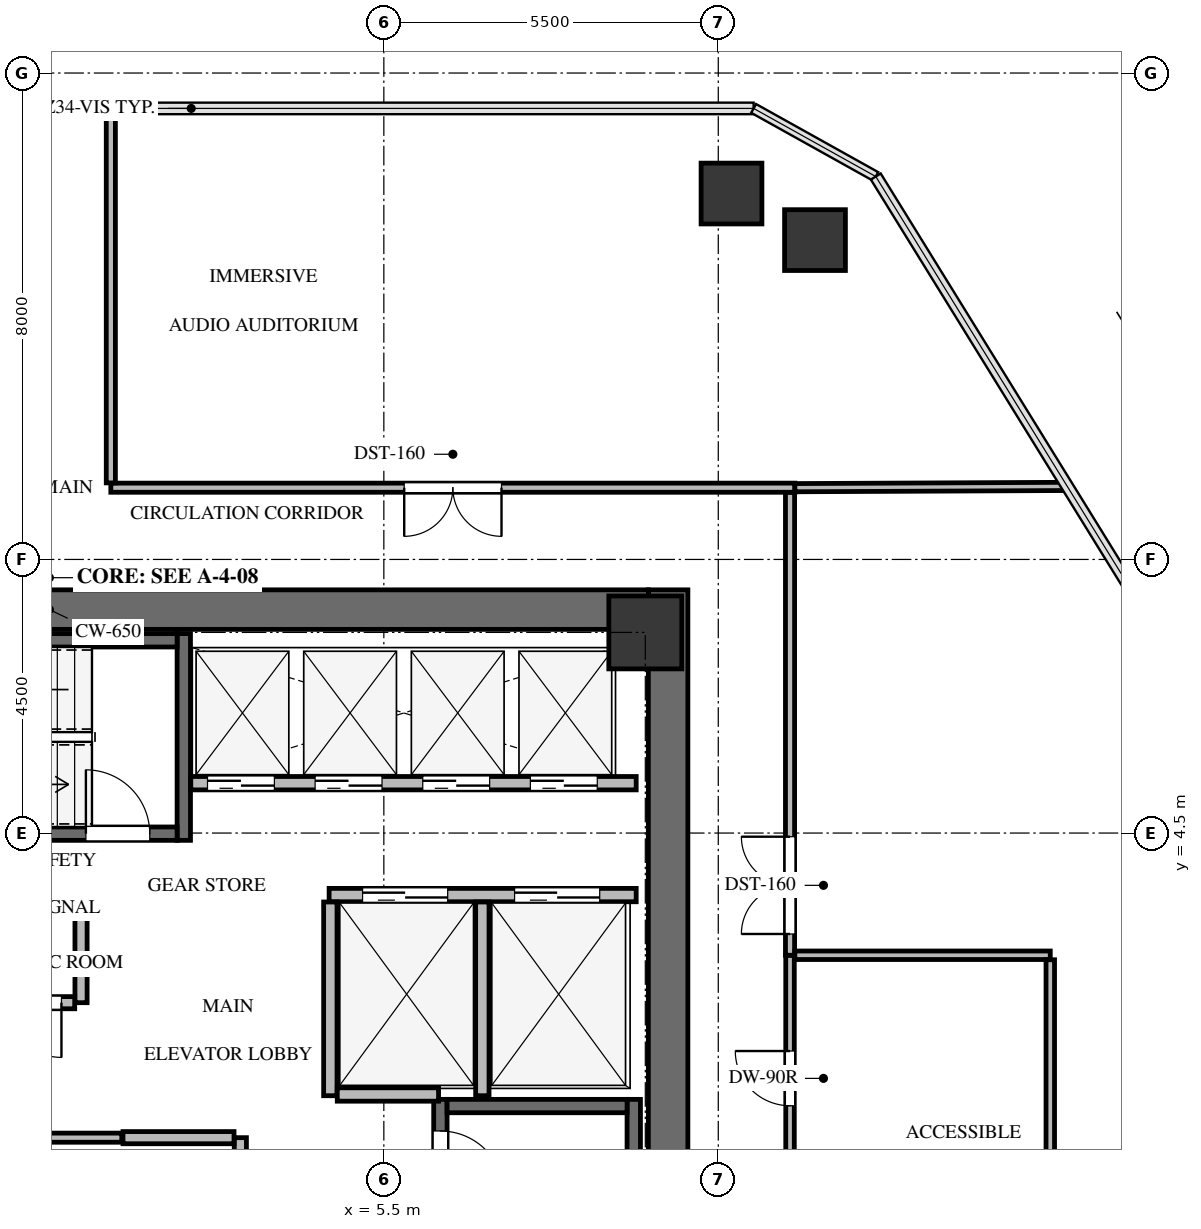
"""IFC4 building model, lengths in metres.
Left out: names, types, materials, properties, quantities, classifications, styles, units other than length and angle.
Written with IfcOpenShell. Run it as: python <this file> out.ifc"""

import sys

from ifc_helpers import new_model, si_unit, direction, frame, frame_2d, origin, origin_2d, place, context, subcontext, project, spatial, rectangle, extrude, source, transform, mapped, element, fill, save


model = new_model("IFC4")
c1 = context("Model", 3, precision=1e-05, world=origin(), true_north=direction((0.0, 1.0)))
c2 = subcontext(c1, "Body", "Model", "MODEL_VIEW")
j1 = project(units=[si_unit("LENGTHUNIT", "METRE"), si_unit("PLANEANGLEUNIT", "RADIAN")], contexts=[c1])
p1 = place(None, origin())
s1 = spatial("IfcSite", under=j1, at=p1, CompositionType="ELEMENT")
p2 = place(p1, origin())
s2 = spatial("IfcBuilding", under=s1, at=p2, CompositionType="ELEMENT")
p3 = place(p2, frame((0.0, 0.0, 167.2)))
s3 = spatial("IfcBuildingStorey", under=s2, at=p3, CompositionType="ELEMENT", Elevation=167.2)
p4 = place(p3, frame((10.175, -8.5, 0.0), z_axis=(0.0, 0.0, 1.0), x_axis=(0.0, 1.0, 0.0)))
e1 = element("IfcWall", 1, at=p4, inside=s3, PredefinedType="SHEAR", context=c2, shape_type="SweptSolid", body=[
    extrude(rectangle(XDim=17.0, YDim=0.65, at=frame_2d((8.5, 0.0))), origin(), (0.0, 0.0, 1.0), 3.3),
])
p5 = place(p3, frame((-9.85, 8.175, 0.0), z_axis=(0.0, 0.0, 1.0), x_axis=(1.0, 0.0, 0.0)))
e2 = element("IfcWall", 2, at=p5, inside=s3, PredefinedType="SHEAR", context=c2, shape_type="SweptSolid", body=[
    extrude(rectangle(XDim=19.7, YDim=0.65, at=frame_2d((9.85, 0.0))), origin(), (0.0, 0.0, 1.0), 3.3),
])
p6 = place(p3, frame((9.61, -7.77, -0.24), z_axis=(0.0, 0.0, 1.0), x_axis=(0.0, 1.0, 0.0)))
e3 = element("IfcWall", 3, at=p6, inside=s3, PredefinedType="SHEAR", context=c2, shape_type="SweptSolid", body=[
    extrude(rectangle(XDim=7.89, YDim=0.22, at=frame_2d((3.945, 0.0))), origin(), (0.0, 0.0, 1.0), 3.3),
])
p7 = place(p3, frame((6.43, 0.12, -0.24), z_axis=(0.0, 0.0, 1.0), x_axis=(0.0, -1.0, 0.0)))
e4 = element("IfcWall", 4, at=p7, inside=s3, PredefinedType="SHEAR", context=c2, shape_type="SweptSolid", body=[
    extrude(rectangle(XDim=7.89, YDim=0.22, at=frame_2d((3.945, 0.0))), origin(), (0.0, 0.0, 1.0), 3.3),
])
p8 = place(p7, frame((0.52, 0.0, 0.0)))
e5 = element("IfcOpeningElement", 5, at=p8, cuts=e4, PredefinedType="OPENING", context=c2, shape_type="SweptSolid", body=[
    extrude(rectangle(XDim=1.05, YDim=2.15, at=frame_2d((0.525, 1.075))), frame((0.0, 0.12, 0.0), z_axis=(0.0, -1.0, 0.0), x_axis=(1.0, 0.0, 0.0)), (0.0, 0.0, 1.0), 0.24),
])
p9 = place(p3, frame((9.5, 0.01, -0.24), z_axis=(0.0, 0.0, 1.0), x_axis=(-1.0, 0.0, 0.0)))
e6 = element("IfcWall", 6, at=p9, inside=s3, PredefinedType="SHEAR", context=c2, shape_type="SweptSolid", body=[
    extrude(rectangle(XDim=2.96, YDim=0.22, at=frame_2d((1.48, 0.0))), origin(), (0.0, 0.0, 1.0), 3.3),
])
p10 = place(p3, frame((2.21, 4.38, -0.24), z_axis=(0.0, 0.0, 1.0), x_axis=(0.0, 1.0, 0.0)))
e7 = element("IfcWall", 7, at=p10, inside=s3, PredefinedType="SHEAR", context=c2, shape_type="SweptSolid", body=[
    extrude(rectangle(XDim=3.4, YDim=0.22, at=frame_2d((1.7, 0.0))), origin(), (0.0, 0.0, 1.0), 3.3),
])
p11 = place(p3, frame((-5.25, 4.49, -0.24), z_axis=(0.0, 0.0, 1.0), x_axis=(1.0, 0.0, 0.0)))
e8 = element("IfcWall", 8, at=p11, inside=s3, PredefinedType="SHEAR", context=c2, shape_type="SweptSolid", body=[
    extrude(rectangle(XDim=7.35, YDim=0.22, at=frame_2d((3.675, 0.0))), origin(), (0.0, 0.0, 1.0), 3.3),
])
p12 = place(p11, frame((5.85, 0.0, 0.0)))
e9 = element("IfcOpeningElement", 9, at=p12, cuts=e8, PredefinedType="OPENING", context=c2, shape_type="SweptSolid", body=[
    extrude(rectangle(XDim=1.05, YDim=2.15, at=frame_2d((0.525, 1.075))), frame((0.0, 0.12, 0.0), z_axis=(0.0, -1.0, 0.0), x_axis=(1.0, 0.0, 0.0)), (0.0, 0.0, 1.0), 0.24),
])
p13 = place(p3, frame((2.1, 7.67, -0.24), z_axis=(0.0, 0.0, 1.0), x_axis=(-1.0, 0.0, 0.0)))
e10 = element("IfcWall", 10, at=p13, inside=s3, PredefinedType="SHEAR", context=c2, shape_type="SweptSolid", body=[
    extrude(rectangle(XDim=7.35, YDim=0.22, at=frame_2d((3.675, 0.0))), origin(), (0.0, 0.0, 1.0), 3.3),
])
m1 = source(origin(), c2, "Body", "SweptSolid", [
    extrude(rectangle(XDim=1.2, YDim=1.2, at=origin_2d()), origin(), (0.0, 0.0, 1.0), 3.3),
])
p14 = place(p3, frame((9.8, 7.8, -0.24), z_axis=(0.0, 0.0, 1.0), x_axis=(1.0, 0.0, 0.0)))
e11 = element("IfcColumn", 11, at=p14, inside=s3, PredefinedType="COLUMN", context=c2, shape_type="MappedRepresentation", body=[
    mapped(m1, transform((0.0, 0.0, 0.0), x_axis=(1.0, 0.0, 0.0), y_axis=(0.0, 1.0, 0.0), z_axis=(0.0, 0.0, 1.0), scale=1.0)),
])
m2 = source(origin(), c2, "Body", "SweptSolid", [
    extrude(rectangle(XDim=1.0, YDim=1.0, at=origin_2d()), origin(), (0.0, 0.0, 1.0), 3.3),
])
for number, where, z_axis, x_axis in (
    (12, (11.218, 15.018, -0.24), (0.0, 0.0, 1.0), (1.0, 0.0, 0.0)),
    (13, (12.591, 14.252, -0.24), (0.0, 0.0, 1.0), (1.0, 0.0, 0.0)),
):
    element("IfcColumn", number, at=place(p3, frame(where, z_axis=z_axis, x_axis=x_axis)), inside=s3, PredefinedType="COLUMN", context=c2, shape_type="MappedRepresentation", body=[
        mapped(m2, transform((0.0, 0.0, 0.0), x_axis=(1.0, 0.0, 0.0), y_axis=(0.0, 1.0, 0.0), z_axis=(0.0, 0.0, 1.0), scale=1.0)),
    ])
p15 = place(p3, frame((4.6, 3.48, 0.0), z_axis=(0.0, 0.0, 1.0), x_axis=(1.0, 0.0, 0.0)))
e14 = element("IfcWall", 14, at=p15, inside=s3, PredefinedType="SOLIDWALL", context=c2, shape_type="SweptSolid", body=[
    extrude(rectangle(XDim=5.05, YDim=0.22, at=frame_2d((2.525, 0.0))), origin(), (0.0, 0.0, 1.0), 3.045),
])
p16 = place(p15, frame((0.55, 0.0, 0.0)))
e15 = element("IfcOpeningElement", 15, at=p16, cuts=e14, PredefinedType="OPENING", context=c2, shape_type="SweptSolid", body=[
    extrude(rectangle(XDim=1.4, YDim=2.15, at=frame_2d((0.7, 1.075))), frame((0.0, 0.12, 0.0), z_axis=(0.0, -1.0, 0.0), x_axis=(1.0, 0.0, 0.0)), (0.0, 0.0, 1.0), 0.24),
])
p17 = place(p15, frame((3.05, 0.0, 0.0)))
e16 = element("IfcOpeningElement", 16, at=p17, cuts=e14, PredefinedType="OPENING", context=c2, shape_type="SweptSolid", body=[
    extrude(rectangle(XDim=1.4, YDim=2.15, at=frame_2d((0.7, 1.075))), frame((0.0, 0.12, 0.0), z_axis=(0.0, -1.0, 0.0), x_axis=(1.0, 0.0, 0.0)), (0.0, 0.0, 1.0), 0.24),
])
for number, where, z_axis, x_axis in (
    (17, (4.62, 0.18, 0.0), (0.0, 0.0, 1.0), (0.0, 1.0, 0.0)),
    (18, (7.12, 0.18, 0.0), (0.0, 0.0, 1.0), (0.0, 1.0, 0.0)),
):
    element("IfcWall", number, at=place(p3, frame(where, z_axis=z_axis, x_axis=x_axis)), inside=s3, PredefinedType="SOLIDWALL", context=c2, shape_type="SweptSolid", body=[
        extrude(rectangle(XDim=3.186, YDim=0.22, at=frame_2d((1.593, 0.0))), origin(), (0.0, 0.0, 1.0), 3.045),
    ])
p18 = place(p3, frame((4.734, 0.2, 0.0), z_axis=(0.0, 0.0, 1.0), x_axis=(1.0, 0.0, 0.0)))
e19 = element("IfcWall", 19, at=p18, inside=s3, PredefinedType="SOLIDWALL", context=c2, shape_type="SweptSolid", body=[
    extrude(rectangle(XDim=1.666, YDim=0.22, at=frame_2d((0.833, 0.0))), origin(), (0.0, 0.0, 1.0), 3.045),
])
p19 = place(p3, frame((2.325, 5.32, 0.0), z_axis=(0.0, 0.0, 1.0), x_axis=(1.0, 0.0, 0.0)))
e20 = element("IfcWall", 20, at=p19, inside=s3, PredefinedType="SOLIDWALL", context=c2, shape_type="SweptSolid", body=[
    extrude(rectangle(XDim=7.325, YDim=0.22, at=frame_2d((3.663, 0.0))), origin(), (0.0, 0.0, 1.0), 3.045),
])
p20 = place(p19, frame((0.275, 0.0, 0.0)))
e21 = element("IfcOpeningElement", 21, at=p20, cuts=e20, PredefinedType="OPENING", context=c2, shape_type="SweptSolid", body=[
    extrude(rectangle(XDim=1.1, YDim=2.15, at=frame_2d((0.55, 1.075))), frame((0.0, 0.12, 0.0), z_axis=(0.0, -1.0, 0.0), x_axis=(1.0, 0.0, 0.0)), (0.0, 0.0, 1.0), 0.24),
])
p21 = place(p19, frame((2.045, 0.0, 0.0)))
e22 = element("IfcOpeningElement", 22, at=p21, cuts=e20, PredefinedType="OPENING", context=c2, shape_type="SweptSolid", body=[
    extrude(rectangle(XDim=1.1, YDim=2.15, at=frame_2d((0.55, 1.075))), frame((0.0, 0.12, 0.0), z_axis=(0.0, -1.0, 0.0), x_axis=(1.0, 0.0, 0.0)), (0.0, 0.0, 1.0), 0.24),
])
p22 = place(p19, frame((3.815, 0.0, 0.0)))
e23 = element("IfcOpeningElement", 23, at=p22, cuts=e20, PredefinedType="OPENING", context=c2, shape_type="SweptSolid", body=[
    extrude(rectangle(XDim=1.1, YDim=2.15, at=frame_2d((0.55, 1.075))), frame((0.0, 0.12, 0.0), z_axis=(0.0, -1.0, 0.0), x_axis=(1.0, 0.0, 0.0)), (0.0, 0.0, 1.0), 0.24),
])
p23 = place(p19, frame((5.585, 0.0, 0.0)))
e24 = element("IfcOpeningElement", 24, at=p23, cuts=e20, PredefinedType="OPENING", context=c2, shape_type="SweptSolid", body=[
    extrude(rectangle(XDim=1.1, YDim=2.15, at=frame_2d((0.55, 1.075))), frame((0.0, 0.12, 0.0), z_axis=(0.0, -1.0, 0.0), x_axis=(1.0, 0.0, 0.0)), (0.0, 0.0, 1.0), 0.24),
])
p24 = place(p3, frame((-4.34, -0.51, 0.0), z_axis=(0.0, 0.0, 1.0), x_axis=(1.0, 0.0, 0.0)))
e25 = element("IfcWall", 25, at=p24, inside=s3, PredefinedType="PARTITIONING", context=c2, shape_type="SweptSolid", body=[
    extrude(rectangle(XDim=5.53, YDim=0.15, at=frame_2d((2.765, 0.0))), origin(), (0.0, 0.0, 1.0), 3.045),
])
p25 = place(p3, frame((3.14, -0.51, 0.0), z_axis=(0.0, 0.0, 1.0), x_axis=(0.0, -1.0, 0.0)))
e26 = element("IfcWall", 26, at=p25, inside=s3, PredefinedType="SOLIDWALL", context=c2, shape_type="SweptSolid", body=[
    extrude(rectangle(XDim=2.53, YDim=0.2, at=frame_2d((1.265, 0.0))), origin(), (0.0, 0.0, 1.0), 3.045),
])
p26 = place(p25, frame((0.815, 0.0, 0.0)))
e27 = element("IfcOpeningElement", 27, at=p26, cuts=e26, PredefinedType="OPENING", context=c2, shape_type="SweptSolid", body=[
    extrude(rectangle(XDim=0.9, YDim=2.05, at=frame_2d((0.45, 1.025))), frame((0.0, 0.11, 0.0), z_axis=(0.0, -1.0, 0.0), x_axis=(1.0, 0.0, 0.0)), (0.0, 0.0, 1.0), 0.22),
])
p27 = place(p3, frame((1.21, -0.51, 0.0), z_axis=(0.0, 0.0, 1.0), x_axis=(1.0, 0.0, 0.0)))
e28 = element("IfcWall", 28, at=p27, inside=s3, PredefinedType="SOLIDWALL", context=c2, shape_type="SweptSolid", body=[
    extrude(rectangle(XDim=1.826, YDim=0.2, at=frame_2d((0.913, 0.0))), origin(), (0.0, 0.0, 1.0), 3.045),
])
p28 = place(p3, frame((0.52, 3.3, 0.0), z_axis=(0.0, 0.0, 1.0), x_axis=(0.0, -1.0, 0.0)))
e29 = element("IfcWall", 29, at=p28, inside=s3, PredefinedType="SOLIDWALL", context=c2, shape_type="SweptSolid", body=[
    extrude(rectangle(XDim=1.59, YDim=0.2, at=frame_2d((0.795, 0.0))), origin(), (0.0, 0.0, 1.0), 3.045),
])
p29 = place(p3, frame((0.416, 1.71, 0.0), z_axis=(0.0, 0.0, 1.0), x_axis=(-1.0, 0.0, 0.0)))
e30 = element("IfcWall", 30, at=p29, inside=s3, PredefinedType="SOLIDWALL", context=c2, shape_type="SweptSolid", body=[
    extrude(rectangle(XDim=1.336, YDim=0.2, at=frame_2d((0.668, 0.0))), origin(), (0.0, 0.0, 1.0), 3.045),
])
p30 = place(p29, frame((0.218, 0.0, 0.0)))
e31 = element("IfcOpeningElement", 31, at=p30, cuts=e30, PredefinedType="OPENING", context=c2, shape_type="SweptSolid", body=[
    extrude(rectangle(XDim=0.9, YDim=2.05, at=frame_2d((0.45, 1.025))), frame((0.0, 0.11, 0.0), z_axis=(0.0, -1.0, 0.0), x_axis=(1.0, 0.0, 0.0)), (0.0, 0.0, 1.0), 0.22),
])
p31 = place(p3, frame((12.18, -1.56, 0.0), z_axis=(0.0, 0.0, 1.0), x_axis=(0.0, 1.0, 0.0)))
e32 = element("IfcWall", 32, at=p31, inside=s3, PredefinedType="PARTITIONING", context=c2, shape_type="SweptSolid", body=[
    extrude(rectangle(XDim=4.05, YDim=0.14, at=frame_2d((2.025, 0.0))), origin(), (0.0, 0.0, 1.0), 2.242),
])
p32 = place(p31, frame((1.575, 0.0, 0.0)))
e33 = element("IfcOpeningElement", 33, at=p32, cuts=e32, PredefinedType="OPENING", context=c2, shape_type="SweptSolid", body=[
    extrude(rectangle(XDim=0.9, YDim=2.05, at=frame_2d((0.45, 1.025))), frame((0.0, 0.08, 0.0), z_axis=(0.0, -1.0, 0.0), x_axis=(1.0, 0.0, 0.0)), (0.0, 0.0, 1.0), 0.16),
])
p33 = place(p3, frame((12.26, 10.18, 0.0), z_axis=(0.0, 0.0, 1.0), x_axis=(-1.0, 0.0, 0.0)))
e34 = element("IfcWall", 34, at=p33, inside=s3, PredefinedType="PARTITIONING", context=c2, shape_type="SweptSolid", body=[
    extrude(rectangle(XDim=11.25, YDim=0.15, at=frame_2d((5.625, 0.0))), origin(), (0.0, 0.0, 1.0), 2.242),
])
p34 = place(p33, frame((4.825, 0.0, 0.0)))
e35 = element("IfcOpeningElement", 35, at=p34, cuts=e34, PredefinedType="OPENING", context=c2, shape_type="SweptSolid", body=[
    extrude(rectangle(XDim=1.6, YDim=2.15, at=frame_2d((0.8, 1.075))), frame((0.0, 0.085, 0.0), z_axis=(0.0, -1.0, 0.0), x_axis=(1.0, 0.0, 0.0)), (0.0, 0.0, 1.0), 0.17),
])
p35 = place(p3, frame((1.01, 10.259, 0.0), z_axis=(0.0, 0.0, 1.0), x_axis=(0.0, 1.0, 0.0)))
e36 = element("IfcWall", 36, at=p35, inside=s3, PredefinedType="PARTITIONING", context=c2, shape_type="SweptSolid", body=[
    extrude(rectangle(XDim=6.159, YDim=0.15, at=frame_2d((3.08, 0.0))), origin(), (0.0, 0.0, 1.0), 2.399),
])
p36 = place(p3, frame((12.18, 2.49, 0.0), z_axis=(0.0, 0.0, 1.0), x_axis=(0.0, 1.0, 0.0)))
e37 = element("IfcWall", 37, at=p36, inside=s3, PredefinedType="PARTITIONING", context=c2, shape_type="SweptSolid", body=[
    extrude(rectangle(XDim=7.611, YDim=0.15, at=frame_2d((3.806, 0.0))), origin(), (0.0, 0.0, 1.0), 3.045),
])
p37 = place(p36, frame((0.35, 0.0, 0.0)))
e38 = element("IfcOpeningElement", 38, at=p37, cuts=e37, PredefinedType="OPENING", context=c2, shape_type="SweptSolid", body=[
    extrude(rectangle(XDim=1.6, YDim=2.15, at=frame_2d((0.8, 1.075))), frame((0.0, 0.085, 0.0), z_axis=(0.0, -1.0, 0.0), x_axis=(1.0, 0.0, 0.0)), (0.0, 0.0, 1.0), 0.17),
])
p38 = place(p3, frame((12.259, 2.49, 0.0), z_axis=(0.0, 0.0, 1.0), x_axis=(1.0, 0.0, 0.0)))
e39 = element("IfcWall", 39, at=p38, inside=s3, PredefinedType="PARTITIONING", context=c2, shape_type="SweptSolid", body=[
    extrude(rectangle(XDim=4.201, YDim=0.14, at=frame_2d((2.101, 0.0))), origin(), (0.0, 0.0, 1.0), 3.045),
])
p39 = place(p3, frame((16.46, 2.416, 0.0), z_axis=(0.0, 0.0, 1.0), x_axis=(0.0, -1.0, 0.0)))
e40 = element("IfcWall", 40, at=p39, inside=s3, PredefinedType="PARTITIONING", context=c2, shape_type="SweptSolid", body=[
    extrude(rectangle(XDim=3.902, YDim=0.14, at=frame_2d((1.951, 0.0))), origin(), (0.0, 0.0, 1.0), 2.242),
])
p40 = place(p3, frame((16.74, 10.201, 0.0), z_axis=(0.0, 0.0, 1.0), x_axis=(-0.999989522694, -0.004577608714, 0.0)))
e41 = element("IfcWall", 41, at=p40, inside=s3, PredefinedType="PARTITIONING", context=c2, shape_type="SweptSolid", body=[
    extrude(rectangle(XDim=4.48, YDim=0.135, at=frame_2d((2.24, 0.0))), origin(), (0.0, 0.0, 1.0), 2.399),
])
m3 = source(origin(), c2, "Body", "SweptSolid", [
    extrude(rectangle(XDim=1.05, YDim=2.15, at=frame_2d((0.525, 1.075))), frame((0.0, 0.025, 0.0), z_axis=(0.0, -1.0, 0.0), x_axis=(1.0, 0.0, 0.0)), (0.0, 0.0, 1.0), 0.05),
])
p41 = place(p8, origin())
e42 = element("IfcDoor", 42, at=p41, inside=s3, OperationType="SINGLE_SWING_RIGHT", PredefinedType="DOOR", context=c2, shape_type="MappedRepresentation", body=[
    mapped(m3, transform((0.0, 0.0, 0.0), x_axis=(1.0, 0.0, 0.0), y_axis=(0.0, 1.0, 0.0), z_axis=(0.0, 0.0, 1.0), scale=1.0)),
])
fill(e5, e42)
m4 = source(origin(), c2, "Body", "SweptSolid", [
    extrude(rectangle(XDim=1.05, YDim=2.15, at=frame_2d((0.525, 1.075))), frame((0.0, 0.025, 0.0), z_axis=(0.0, -1.0, 0.0), x_axis=(1.0, 0.0, 0.0)), (0.0, 0.0, 1.0), 0.05),
])
p42 = place(p12, origin())
e43 = element("IfcDoor", 43, at=p42, inside=s3, OperationType="SINGLE_SWING_LEFT", PredefinedType="DOOR", context=c2, shape_type="MappedRepresentation", body=[
    mapped(m4, transform((0.0, 0.0, 0.0), x_axis=(1.0, 0.0, 0.0), y_axis=(0.0, 1.0, 0.0), z_axis=(0.0, 0.0, 1.0), scale=1.0)),
])
fill(e9, e43)
m5 = source(origin(), c2, "Body", "SweptSolid", [
    extrude(rectangle(XDim=1.4, YDim=2.15, at=frame_2d((0.7, 1.075))), frame((0.0, 0.025, 0.0), z_axis=(0.0, -1.0, 0.0), x_axis=(1.0, 0.0, 0.0)), (0.0, 0.0, 1.0), 0.05),
])
p43 = place(p16, origin())
e44 = element("IfcDoor", 44, at=p43, inside=s3, OperationType="DOUBLE_DOOR_SLIDING", PredefinedType="DOOR", context=c2, shape_type="MappedRepresentation", body=[
    mapped(m5, transform((0.0, 0.0, 0.0), x_axis=(1.0, 0.0, 0.0), y_axis=(0.0, 1.0, 0.0), z_axis=(0.0, 0.0, 1.0), scale=1.0)),
])
fill(e15, e44)
p44 = place(p17, origin())
e45 = element("IfcDoor", 45, at=p44, inside=s3, OperationType="DOUBLE_DOOR_SLIDING", PredefinedType="DOOR", context=c2, shape_type="MappedRepresentation", body=[
    mapped(m5, transform((0.0, 0.0, 0.0), x_axis=(1.0, 0.0, 0.0), y_axis=(0.0, 1.0, 0.0), z_axis=(0.0, 0.0, 1.0), scale=1.0)),
])
fill(e16, e45)
m6 = source(origin(), c2, "Body", "SweptSolid", [
    extrude(rectangle(XDim=1.1, YDim=2.15, at=frame_2d((0.55, 1.075))), frame((0.0, 0.025, 0.0), z_axis=(0.0, -1.0, 0.0), x_axis=(1.0, 0.0, 0.0)), (0.0, 0.0, 1.0), 0.05),
])
p45 = place(p20, origin())
e46 = element("IfcDoor", 46, at=p45, inside=s3, OperationType="DOUBLE_DOOR_SLIDING", PredefinedType="DOOR", context=c2, shape_type="MappedRepresentation", body=[
    mapped(m6, transform((0.0, 0.0, 0.0), x_axis=(1.0, 0.0, 0.0), y_axis=(0.0, 1.0, 0.0), z_axis=(0.0, 0.0, 1.0), scale=1.0)),
])
fill(e21, e46)
p46 = place(p21, origin())
e47 = element("IfcDoor", 47, at=p46, inside=s3, OperationType="DOUBLE_DOOR_SLIDING", PredefinedType="DOOR", context=c2, shape_type="MappedRepresentation", body=[
    mapped(m6, transform((0.0, 0.0, 0.0), x_axis=(1.0, 0.0, 0.0), y_axis=(0.0, 1.0, 0.0), z_axis=(0.0, 0.0, 1.0), scale=1.0)),
])
fill(e22, e47)
p47 = place(p22, origin())
e48 = element("IfcDoor", 48, at=p47, inside=s3, OperationType="DOUBLE_DOOR_SLIDING", PredefinedType="DOOR", context=c2, shape_type="MappedRepresentation", body=[
    mapped(m6, transform((0.0, 0.0, 0.0), x_axis=(1.0, 0.0, 0.0), y_axis=(0.0, 1.0, 0.0), z_axis=(0.0, 0.0, 1.0), scale=1.0)),
])
fill(e23, e48)
p48 = place(p23, origin())
e49 = element("IfcDoor", 49, at=p48, inside=s3, OperationType="DOUBLE_DOOR_SLIDING", PredefinedType="DOOR", context=c2, shape_type="MappedRepresentation", body=[
    mapped(m6, transform((0.0, 0.0, 0.0), x_axis=(1.0, 0.0, 0.0), y_axis=(0.0, 1.0, 0.0), z_axis=(0.0, 0.0, 1.0), scale=1.0)),
])
fill(e24, e49)
m7 = source(origin(), c2, "Body", "SweptSolid", [
    extrude(rectangle(XDim=0.9, YDim=2.05, at=frame_2d((0.45, 1.025))), frame((0.0, 0.025, 0.0), z_axis=(0.0, -1.0, 0.0), x_axis=(1.0, 0.0, 0.0)), (0.0, 0.0, 1.0), 0.05),
])
p49 = place(p30, origin())
e50 = element("IfcDoor", 50, at=p49, inside=s3, OperationType="SINGLE_SWING_LEFT", PredefinedType="DOOR", context=c2, shape_type="MappedRepresentation", body=[
    mapped(m7, transform((0.0, 0.0, 0.0), x_axis=(1.0, 0.0, 0.0), y_axis=(0.0, 1.0, 0.0), z_axis=(0.0, 0.0, 1.0), scale=1.0)),
])
fill(e31, e50)
m8 = source(origin(), c2, "Body", "SweptSolid", [
    extrude(rectangle(XDim=0.9, YDim=2.05, at=frame_2d((0.45, 1.025))), frame((0.0, 0.025, 0.0), z_axis=(0.0, -1.0, 0.0), x_axis=(1.0, 0.0, 0.0)), (0.0, 0.0, 1.0), 0.05),
])
p50 = place(p32, origin())
e51 = element("IfcDoor", 51, at=p50, inside=s3, OperationType="SINGLE_SWING_RIGHT", PredefinedType="DOOR", context=c2, shape_type="MappedRepresentation", body=[
    mapped(m8, transform((0.0, 0.0, 0.0), x_axis=(1.0, 0.0, 0.0), y_axis=(0.0, 1.0, 0.0), z_axis=(0.0, 0.0, 1.0), scale=1.0)),
])
fill(e33, e51)
m9 = source(origin(), c2, "Body", "SweptSolid", [
    extrude(rectangle(XDim=1.6, YDim=2.15, at=frame_2d((0.8, 1.075))), frame((0.0, 0.025, 0.0), z_axis=(0.0, -1.0, 0.0), x_axis=(1.0, 0.0, 0.0)), (0.0, 0.0, 1.0), 0.05),
])
p51 = place(p34, origin())
e52 = element("IfcDoor", 52, at=p51, inside=s3, OperationType="DOUBLE_DOOR_SINGLE_SWING", PredefinedType="DOOR", context=c2, shape_type="MappedRepresentation", body=[
    mapped(m9, transform((0.0, 0.0, 0.0), x_axis=(1.0, 0.0, 0.0), y_axis=(0.0, 1.0, 0.0), z_axis=(0.0, 0.0, 1.0), scale=1.0)),
])
fill(e35, e52)
p52 = place(p37, origin())
e53 = element("IfcDoor", 53, at=p52, inside=s3, OperationType="DOUBLE_DOOR_SINGLE_SWING", PredefinedType="DOOR", context=c2, shape_type="MappedRepresentation", body=[
    mapped(m9, transform((0.0, 0.0, 0.0), x_axis=(1.0, 0.0, 0.0), y_axis=(0.0, 1.0, 0.0), z_axis=(0.0, 0.0, 1.0), scale=1.0)),
])
fill(e38, e53)
save(model, sys.argv[1])
